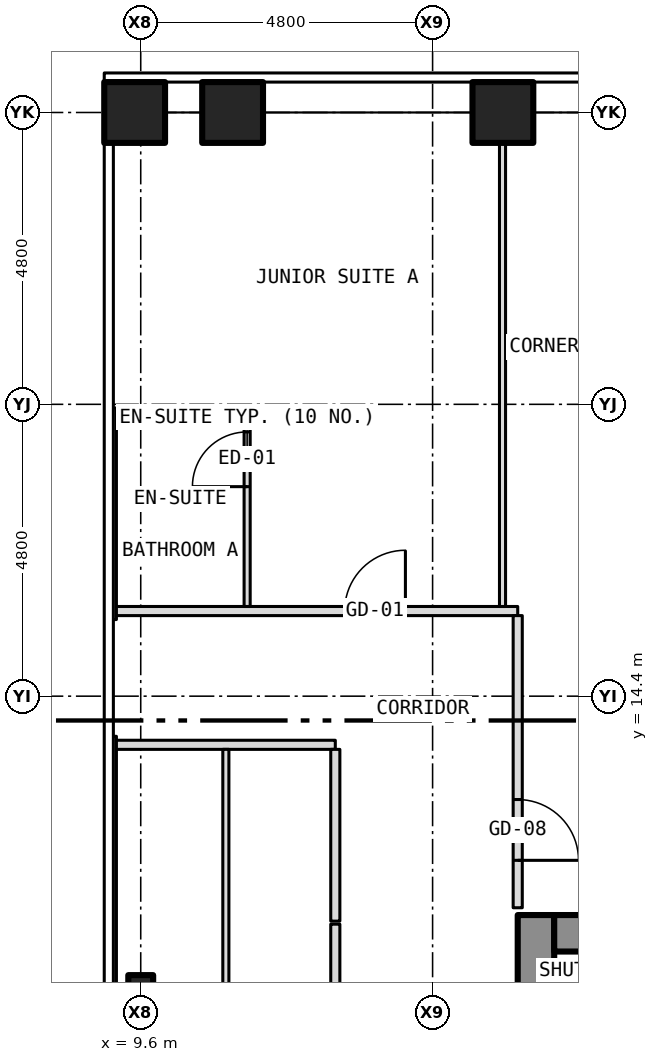
"""IFC4 building model, lengths in metres.
Left out: names, types, materials, properties, quantities, classifications, styles, units other than length and angle.
Written with IfcOpenShell. Run it as: python <this file> out.ifc"""

import sys

from ifc_helpers import new_model, si_unit, direction, frame, frame_2d, origin, origin_2d, place, context, subcontext, project, spatial, rectangle, hollow_rectangle, i_section, extrude, element, fill, save


model = new_model("IFC4")
c1 = context("Model", 3, precision=1e-05, world=origin(), true_north=direction((0.0, 1.0)))
c2 = subcontext(c1, "Body", "Model", "MODEL_VIEW")
j1 = project(units=[si_unit("LENGTHUNIT", "METRE"), si_unit("PLANEANGLEUNIT", "RADIAN")], contexts=[c1])
p1 = place(None, origin())
s1 = spatial("IfcSite", under=j1, at=p1, CompositionType="ELEMENT")
p2 = place(p1, origin())
s2 = spatial("IfcBuilding", under=s1, at=p2, CompositionType="ELEMENT")
p3 = place(p2, frame((0.0, 0.0, 63.5)))
s3 = spatial("IfcBuildingStorey", under=s2, at=p3, CompositionType="ELEMENT", Elevation=63.5)
for number, where, z_axis, x_axis in (
    (1, (11.111, 24.0, -0.15), (0.0, 0.0, 1.0), (1.0, 0.0, 0.0)),
    (2, (15.556, 24.0, -0.15), (0.0, 0.0, 1.0), (1.0, 0.0, 0.0)),
    (3, (9.5, 24.0, -0.15), (0.0, 0.0, 1.0), (1.0, 0.0, 0.0)),
):
    element("IfcColumn", number, at=place(p3, frame(where, z_axis=z_axis, x_axis=x_axis)), inside=s3, PredefinedType="COLUMN", context=c2, shape_type="SweptSolid", body=[
        extrude(hollow_rectangle(XDim=1.0, YDim=1.0, WallThickness=0.06, at=origin_2d()), origin(), (0.0, 0.0, 1.0), 3.5),
    ])
p4 = place(p3, frame((9.6, 9.6, -0.15), z_axis=(0.0, 0.0, 1.0), x_axis=(1.0, 0.0, 0.0)))
e4 = element("IfcColumn", 4, at=p4, inside=s3, PredefinedType="COLUMN", context=c2, shape_type="SweptSolid", body=[
    extrude(i_section(OverallWidth=0.409, OverallDepth=0.424, WebThickness=0.033, FlangeThickness=0.052, at=origin_2d()), origin(), (0.0, 0.0, 1.0), 3.5),
])
p5 = place(p3, frame((16.1, -10.8, 0.0), z_axis=(0.0, 0.0, 1.0), x_axis=(0.0, 1.0, 0.0)))
e5 = element("IfcWall", 5, at=p5, inside=s3, PredefinedType="SHEAR", context=c2, shape_type="SweptSolid", body=[
    extrude(rectangle(XDim=21.6, YDim=0.6, at=frame_2d((10.8, 0.0))), origin(), (0.0, 0.0, 1.0), 3.25),
])
p6 = place(p5, frame((9.4, 0.0, 0.0)))
e6 = element("IfcOpeningElement", 6, at=p6, cuts=e5, PredefinedType="OPENING", context=c2, shape_type="SweptSolid", body=[
    extrude(rectangle(XDim=1.1, YDim=2.1, at=frame_2d((0.55, 1.05))), frame((0.0, 0.312, 0.0), z_axis=(0.0, -1.0, 0.0), x_axis=(1.0, 0.0, 0.0)), (0.0, 0.0, 1.0), 0.624),
])
p7 = place(p5, frame((11.5, 0.0, 0.0)))
e7 = element("IfcOpeningElement", 7, at=p7, cuts=e5, PredefinedType="OPENING", context=c2, shape_type="SweptSolid", body=[
    extrude(rectangle(XDim=1.1, YDim=2.1, at=frame_2d((0.55, 1.05))), frame((0.0, 0.312, 0.0), z_axis=(0.0, -1.0, 0.0), x_axis=(1.0, 0.0, 0.0)), (0.0, 0.0, 1.0), 0.624),
])
p8 = place(p5, frame((13.6, 0.0, 0.0)))
e8 = element("IfcOpeningElement", 8, at=p8, cuts=e5, PredefinedType="OPENING", context=c2, shape_type="SweptSolid", body=[
    extrude(rectangle(XDim=1.1, YDim=2.1, at=frame_2d((0.55, 1.05))), frame((0.0, 0.312, 0.0), z_axis=(0.0, -1.0, 0.0), x_axis=(1.0, 0.0, 0.0)), (0.0, 0.0, 1.0), 0.624),
])
p9 = place(p5, frame((15.7, 0.0, 0.0)))
e9 = element("IfcOpeningElement", 9, at=p9, cuts=e5, PredefinedType="OPENING", context=c2, shape_type="SweptSolid", body=[
    extrude(rectangle(XDim=1.1, YDim=2.1, at=frame_2d((0.55, 1.05))), frame((0.0, 0.312, 0.0), z_axis=(0.0, -1.0, 0.0), x_axis=(1.0, 0.0, 0.0)), (0.0, 0.0, 1.0), 0.624),
])
p10 = place(p5, frame((17.8, 0.0, 0.0)))
e10 = element("IfcOpeningElement", 10, at=p10, cuts=e5, PredefinedType="OPENING", context=c2, shape_type="SweptSolid", body=[
    extrude(rectangle(XDim=1.1, YDim=2.1, at=frame_2d((0.55, 1.05))), frame((0.0, 0.312, 0.0), z_axis=(0.0, -1.0, 0.0), x_axis=(1.0, 0.0, 0.0)), (0.0, 0.0, 1.0), 0.624),
])
p11 = place(p5, frame((5.642, 0.0, 0.0)))
e11 = element("IfcOpeningElement", 11, at=p11, cuts=e5, PredefinedType="OPENING", context=c2, shape_type="SweptSolid", body=[
    extrude(rectangle(XDim=1.1, YDim=2.1, at=frame_2d((0.55, 1.05))), frame((0.0, 0.312, 0.0), z_axis=(0.0, -1.0, 0.0), x_axis=(1.0, 0.0, 0.0)), (0.0, 0.0, 1.0), 0.624),
])
p12 = place(p5, frame((7.5, 0.0, 0.0)))
e12 = element("IfcOpeningElement", 12, at=p12, cuts=e5, PredefinedType="OPENING", context=c2, shape_type="SweptSolid", body=[
    extrude(rectangle(XDim=1.1, YDim=2.1, at=frame_2d((0.55, 1.05))), frame((0.0, 0.312, 0.0), z_axis=(0.0, -1.0, 0.0), x_axis=(1.0, 0.0, 0.0)), (0.0, 0.0, 1.0), 0.624),
])
p13 = place(p3, frame((16.4, 10.5, 0.0), z_axis=(0.0, 0.0, 1.0), x_axis=(1.0, 0.0, 0.0)))
e13 = element("IfcWall", 13, at=p13, inside=s3, PredefinedType="SHEAR", context=c2, shape_type="SweptSolid", body=[
    extrude(rectangle(XDim=7.0, YDim=0.6, at=frame_2d((3.5, 0.0))), origin(), (0.0, 0.0, 1.0), 3.25),
])
p14 = place(p3, frame((9.15, 13.6, 0.0), z_axis=(0.0, 0.0, 1.0), x_axis=(1.0, 0.0, 0.0)))
e14 = element("IfcWall", 14, at=p14, inside=s3, PredefinedType="PARTITIONING", context=c2, shape_type="SweptSolid", body=[
    extrude(rectangle(XDim=3.65, YDim=0.15, at=frame_2d((1.825, 0.0))), origin(), (0.0, 0.0, 1.0), 3.35),
])
p15 = place(p3, frame((9.15, 15.8, 0.0), z_axis=(0.0, 0.0, 1.0), x_axis=(1.0, 0.0, 0.0)))
e15 = element("IfcWall", 15, at=p15, inside=s3, PredefinedType="PARTITIONING", context=c2, shape_type="SweptSolid", body=[
    extrude(rectangle(XDim=6.65, YDim=0.15, at=frame_2d((3.325, 0.0))), origin(), (0.0, 0.0, 1.0), 3.35),
])
p16 = place(p15, frame((3.803, 0.0, 0.0)))
e16 = element("IfcOpeningElement", 16, at=p16, cuts=e15, PredefinedType="OPENING", context=c2, shape_type="SweptSolid", body=[
    extrude(rectangle(XDim=1.0, YDim=2.1, at=frame_2d((0.5, 1.05))), frame((0.0, 0.087, 0.0), z_axis=(0.0, -1.0, 0.0), x_axis=(1.0, 0.0, 0.0)), (0.0, 0.0, 1.0), 0.174),
])
p17 = place(p3, frame((9.15, 19.0, 0.0), z_axis=(0.0, 0.0, 1.0), x_axis=(1.0, 0.0, 0.0)))
e17 = element("IfcWall", 17, at=p17, inside=s3, PredefinedType="PARTITIONING", context=c2, shape_type="SweptSolid", body=[
    extrude(rectangle(XDim=2.2, YDim=0.1, at=frame_2d((1.1, 0.0))), origin(), (0.0, 0.0, 1.0), 3.35),
])
p18 = place(p3, frame((9.15, 3.16, 0.0), z_axis=(0.0, 0.0, 1.0), x_axis=(0.0, 1.0, 0.0)))
e18 = element("IfcWall", 18, at=p18, inside=s3, PredefinedType="PARTITIONING", context=c2, shape_type="SweptSolid", body=[
    extrude(rectangle(XDim=10.58, YDim=0.1, at=frame_2d((5.29, 0.0))), origin(), (0.0, 0.0, 1.0), 2.733),
])
p19 = place(p3, frame((9.15, 15.66, 0.0), z_axis=(0.0, 0.0, 1.0), x_axis=(0.0, 1.0, 0.0)))
e19 = element("IfcWall", 19, at=p19, inside=s3, PredefinedType="PARTITIONING", context=c2, shape_type="SweptSolid", body=[
    extrude(rectangle(XDim=3.48, YDim=0.1, at=frame_2d((1.74, 0.0))), origin(), (0.0, 0.0, 1.0), 2.733),
])
p20 = place(p3, frame((11.0, 3.375, 0.0), z_axis=(0.0, 0.0, 1.0), x_axis=(0.0, 1.0, 0.0)))
e20 = element("IfcWall", 20, at=p20, inside=s3, PredefinedType="PARTITIONING", context=c2, shape_type="SweptSolid", body=[
    extrude(rectangle(XDim=10.15, YDim=0.1, at=frame_2d((5.075, 0.0))), origin(), (0.0, 0.0, 1.0), 3.35),
])
p21 = place(p3, frame((11.35, 15.875, 0.0), z_axis=(0.0, 0.0, 1.0), x_axis=(0.0, 1.0, 0.0)))
e21 = element("IfcWall", 21, at=p21, inside=s3, PredefinedType="PARTITIONING", context=c2, shape_type="SweptSolid", body=[
    extrude(rectangle(XDim=3.075, YDim=0.1, at=frame_2d((1.538, 0.0))), origin(), (0.0, 0.0, 1.0), 3.35),
])
p22 = place(p21, frame((1.971, 0.0, 0.0)))
e22 = element("IfcOpeningElement", 22, at=p22, cuts=e21, PredefinedType="OPENING", context=c2, shape_type="SweptSolid", body=[
    extrude(rectangle(XDim=0.9, YDim=2.1, at=frame_2d((0.45, 1.05))), frame((0.0, 0.062, 0.0), z_axis=(0.0, -1.0, 0.0), x_axis=(1.0, 0.0, 0.0)), (0.0, 0.0, 1.0), 0.124),
])
p23 = place(p3, frame((12.8, 3.375, 0.0), z_axis=(0.0, 0.0, 1.0), x_axis=(0.0, 1.0, 0.0)))
e23 = element("IfcWall", 23, at=p23, inside=s3, PredefinedType="PARTITIONING", context=c2, shape_type="SweptSolid", body=[
    extrude(rectangle(XDim=7.275, YDim=0.15, at=frame_2d((3.637, 0.0))), origin(), (0.0, 0.0, 1.0), 3.35),
])
p24 = place(p23, frame((3.175, 0.0, 0.0)))
e24 = element("IfcOpeningElement", 24, at=p24, cuts=e23, PredefinedType="OPENING", context=c2, shape_type="SweptSolid", body=[
    extrude(rectangle(XDim=0.9, YDim=2.1, at=frame_2d((0.45, 1.05))), frame((0.0, 0.087, 0.0), z_axis=(0.0, -1.0, 0.0), x_axis=(1.0, 0.0, 0.0)), (0.0, 0.0, 1.0), 0.174),
])
p25 = place(p3, frame((12.8, 10.7, 0.0), z_axis=(0.0, 0.0, 1.0), x_axis=(0.0, 1.0, 0.0)))
e25 = element("IfcWall", 25, at=p25, inside=s3, PredefinedType="PARTITIONING", context=c2, shape_type="SweptSolid", body=[
    extrude(rectangle(XDim=2.825, YDim=0.15, at=frame_2d((1.413, 0.0))), origin(), (0.0, 0.0, 1.0), 3.35),
])
p26 = place(p3, frame((15.55, 15.875, 0.0), z_axis=(0.0, 0.0, 1.0), x_axis=(0.0, 1.0, 0.0)))
e26 = element("IfcWall", 26, at=p26, inside=s3, PredefinedType="PARTITIONING", context=c2, shape_type="SweptSolid", body=[
    extrude(rectangle(XDim=8.005, YDim=0.1, at=frame_2d((4.002, 0.0))), origin(), (0.0, 0.0, 1.0), 3.35),
])
p27 = place(p3, frame((15.8, 10.92, 0.0), z_axis=(0.0, 0.0, 1.0), x_axis=(0.0, 1.0, 0.0)))
e27 = element("IfcWall", 27, at=p27, inside=s3, PredefinedType="PARTITIONING", context=c2, shape_type="SweptSolid", body=[
    extrude(rectangle(XDim=4.805, YDim=0.15, at=frame_2d((2.403, 0.0))), origin(), (0.0, 0.0, 1.0), 3.35),
])
p28 = place(p27, frame((0.78, 0.0, 0.0)))
e28 = element("IfcOpeningElement", 28, at=p28, cuts=e27, PredefinedType="OPENING", context=c2, shape_type="SweptSolid", body=[
    extrude(rectangle(XDim=1.0, YDim=2.1, at=frame_2d((0.5, 1.05))), frame((0.0, 0.087, 0.0), z_axis=(0.0, -1.0, 0.0), x_axis=(1.0, 0.0, 0.0)), (0.0, 0.0, 1.0), 0.174),
])
p29 = place(p16, origin())
e29 = element("IfcDoor", 29, at=p29, inside=s3, OperationType="SINGLE_SWING_RIGHT", PredefinedType="DOOR", context=c2, shape_type="SweptSolid", body=[
    extrude(rectangle(XDim=1.0, YDim=2.1, at=frame_2d((0.5, 1.05))), frame((0.0, 0.025, 0.0), z_axis=(0.0, -1.0, 0.0), x_axis=(1.0, 0.0, 0.0)), (0.0, 0.0, 1.0), 0.05),
])
fill(e16, e29)
p30 = place(p22, origin())
e30 = element("IfcDoor", 30, at=p30, inside=s3, OperationType="SINGLE_SWING_LEFT", PredefinedType="DOOR", context=c2, shape_type="SweptSolid", body=[
    extrude(rectangle(XDim=0.9, YDim=2.1, at=frame_2d((0.45, 1.05))), frame((0.0, 0.025, 0.0), z_axis=(0.0, -1.0, 0.0), x_axis=(1.0, 0.0, 0.0)), (0.0, 0.0, 1.0), 0.05),
])
fill(e22, e30)
p31 = place(p28, origin())
e31 = element("IfcDoor", 31, at=p31, inside=s3, OperationType="SINGLE_SWING_LEFT", PredefinedType="DOOR", context=c2, shape_type="SweptSolid", body=[
    extrude(rectangle(XDim=1.0, YDim=2.1, at=frame_2d((0.5, 1.05))), frame((0.0, 0.025, 0.0), z_axis=(0.0, -1.0, 0.0), x_axis=(1.0, 0.0, 0.0)), (0.0, 0.0, 1.0), 0.05),
])
fill(e28, e31)
save(model, sys.argv[1])
